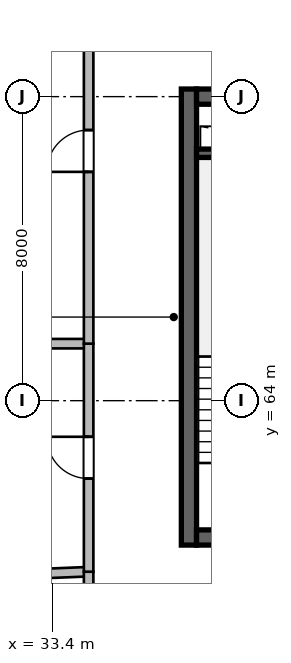
"""IFC4 building model, lengths in metres.
Left out: names, types, materials, properties, quantities, classifications, styles, units other than length and angle.
Written with IfcOpenShell. Run it as: python <this file> out.ifc"""

import sys

from ifc_helpers import new_model, si_unit, direction, frame, frame_2d, origin, place, context, subcontext, project, spatial, rectangle, extrude, source, transform, mapped, element, fill, save


model = new_model("IFC4")
c1 = context("Model", 3, precision=1e-05, world=origin(), true_north=direction((0.0, 1.0)))
c2 = subcontext(c1, "Body", "Model", "MODEL_VIEW")
j1 = project(units=[si_unit("LENGTHUNIT", "METRE"), si_unit("PLANEANGLEUNIT", "RADIAN")], contexts=[c1])
p1 = place(None, origin())
s1 = spatial("IfcSite", under=j1, at=p1, CompositionType="ELEMENT")
p2 = place(p1, origin())
s2 = spatial("IfcBuilding", under=s1, at=p2, CompositionType="ELEMENT")
p3 = place(p2, frame((0.0, 0.0, 291.3)))
s3 = spatial("IfcBuildingStorey", under=s2, at=p3, CompositionType="ELEMENT", Elevation=291.3)
m1 = source(origin(), c2, "Body", "SweptSolid", [
    extrude(rectangle(XDim=12.0, YDim=0.4, at=frame_2d((6.0, 0.0))), origin(), (0.0, 0.0, 1.0), 3.9),
])
p4 = place(p3, frame((37.0, 60.2, 0.0), z_axis=(0.0, 0.0, 1.0), x_axis=(0.0, 1.0, 0.0)))
e1 = element("IfcWall", 1, at=p4, inside=s3, PredefinedType="SHEAR", context=c2, shape_type="MappedRepresentation", body=[
    mapped(m1, transform((0.0, 0.0, 0.0), scale=1.0)),
])
m2 = source(origin(), c2, "Body", "SweptSolid", [
    extrude(rectangle(XDim=21.6, YDim=0.4, at=frame_2d((10.8, 0.0))), origin(), (0.0, 0.0, 1.0), 3.9),
])
p5 = place(p3, frame((37.2, 60.4, 0.0), z_axis=(0.0, 0.0, 1.0), x_axis=(1.0, 0.0, 0.0)))
e2 = element("IfcWall", 2, at=p5, inside=s3, PredefinedType="SHEAR", context=c2, shape_type="MappedRepresentation", body=[
    mapped(m2, transform((0.0, 0.0, 0.0), scale=1.0)),
])
p6 = place(p5, frame((1.1, 0.0, 0.0)))
e3 = element("IfcOpeningElement", 3, at=p6, cuts=e2, PredefinedType="OPENING", context=c2, shape_type="SweptSolid", body=[
    extrude(rectangle(XDim=1.15, YDim=2.15, at=frame_2d((0.575, 1.075))), frame((0.0, 0.21, 0.0), z_axis=(0.0, -1.0, 0.0), x_axis=(1.0, 0.0, 0.0)), (0.0, 0.0, 1.0), 0.42),
])
p7 = place(p5, frame((19.5, 0.0, 0.0)))
e4 = element("IfcOpeningElement", 4, at=p7, cuts=e2, PredefinedType="OPENING", context=c2, shape_type="SweptSolid", body=[
    extrude(rectangle(XDim=0.9, YDim=2.1, at=frame_2d((0.45, 1.05))), frame((0.0, 0.21, 0.0), z_axis=(0.0, -1.0, 0.0), x_axis=(1.0, 0.0, 0.0)), (0.0, 0.0, 1.0), 0.42),
])
p8 = place(p5, frame((12.02, 0.0, 0.0)))
e5 = element("IfcOpeningElement", 5, at=p8, cuts=e2, PredefinedType="OPENING", context=c2, shape_type="SweptSolid", body=[
    extrude(rectangle(XDim=1.6, YDim=2.15, at=frame_2d((0.8, 1.075))), frame((0.0, 0.21, 0.0), z_axis=(0.0, -1.0, 0.0), x_axis=(1.0, 0.0, 0.0)), (0.0, 0.0, 1.0), 0.42),
])
p9 = place(p3, frame((37.2, 72.0, 0.0), z_axis=(0.0, 0.0, 1.0), x_axis=(1.0, 0.0, 0.0)))
e6 = element("IfcWall", 6, at=p9, inside=s3, PredefinedType="SHEAR", context=c2, shape_type="MappedRepresentation", body=[
    mapped(m2, transform((0.0, 0.0, 0.0), scale=1.0)),
])
p10 = place(p9, frame((1.2, 0.0, 0.0)))
e7 = element("IfcOpeningElement", 7, at=p10, cuts=e6, PredefinedType="OPENING", context=c2, shape_type="SweptSolid", body=[
    extrude(rectangle(XDim=0.9, YDim=2.1, at=frame_2d((0.45, 1.05))), frame((0.0, 0.21, 0.0), z_axis=(0.0, -1.0, 0.0), x_axis=(1.0, 0.0, 0.0)), (0.0, 0.0, 1.0), 0.42),
])
p11 = place(p9, frame((14.7, 0.0, 0.0)))
e8 = element("IfcOpeningElement", 8, at=p11, cuts=e6, PredefinedType="OPENING", context=c2, shape_type="SweptSolid", body=[
    extrude(rectangle(XDim=1.2, YDim=2.15, at=frame_2d((0.6, 1.075))), frame((0.0, 0.21, 0.0), z_axis=(0.0, -1.0, 0.0), x_axis=(1.0, 0.0, 0.0)), (0.0, 0.0, 1.0), 0.42),
])
p12 = place(p9, frame((4.15, 0.0, 0.0)))
e9 = element("IfcOpeningElement", 9, at=p12, cuts=e6, PredefinedType="OPENING", context=c2, shape_type="SweptSolid", body=[
    extrude(rectangle(XDim=1.3, YDim=2.15, at=frame_2d((0.65, 1.075))), frame((0.0, 0.21, 0.0), z_axis=(0.0, -1.0, 0.0), x_axis=(1.0, 0.0, 0.0)), (0.0, 0.0, 1.0), 0.42),
])
p13 = place(p9, frame((7.1, 0.0, 0.0)))
e10 = element("IfcOpeningElement", 10, at=p13, cuts=e6, PredefinedType="OPENING", context=c2, shape_type="SweptSolid", body=[
    extrude(rectangle(XDim=0.9, YDim=2.1, at=frame_2d((0.45, 1.05))), frame((0.0, 0.21, 0.0), z_axis=(0.0, -1.0, 0.0), x_axis=(1.0, 0.0, 0.0)), (0.0, 0.0, 1.0), 0.42),
])
m3 = source(origin(), c2, "Body", "SweptSolid", [
    extrude(rectangle(XDim=3.27, YDim=0.22, at=frame_2d((1.635, 0.0))), origin(), (0.0, 0.0, 1.0), 3.9),
])
p14 = place(p3, frame((37.2, 70.51, 0.0), z_axis=(0.0, 0.0, 1.0), x_axis=(1.0, 0.0, 0.0)))
e11 = element("IfcWall", 11, at=p14, inside=s3, PredefinedType="SHEAR", context=c2, shape_type="MappedRepresentation", body=[
    mapped(m3, transform((0.0, 0.0, 0.0), scale=1.0)),
])
m4 = source(origin(), c2, "Body", "SweptSolid", [
    extrude(rectangle(XDim=13.499, YDim=0.25, at=frame_2d((6.75, 0.0))), origin(), (0.0, 0.0, 1.0), 3.64),
])
p15 = place(p3, frame((20.872, 58.951, 0.0), z_axis=(0.0, 0.0, 1.0), x_axis=(0.999172424054, 0.04067513995, 0.0)))
e12 = element("IfcWall", 12, at=p15, inside=s3, PredefinedType="PARTITIONING", context=c2, shape_type="MappedRepresentation", body=[
    mapped(m4, transform((0.0, 0.0, 0.0), scale=1.0)),
])
m5 = source(origin(), c2, "Body", "SweptSolid", [
    extrude(rectangle(XDim=1.54, YDim=0.25, at=frame_2d((0.77, 0.0))), origin(), (0.0, 0.0, 1.0), 3.64),
])
p16 = place(p3, frame((34.36, 57.96, 0.0), z_axis=(0.0, 0.0, 1.0), x_axis=(0.0, 1.0, 0.0)))
e13 = element("IfcWall", 13, at=p16, inside=s3, PredefinedType="PARTITIONING", context=c2, shape_type="MappedRepresentation", body=[
    mapped(m5, transform((0.0, 0.0, 0.0), scale=1.0)),
])
m6 = source(origin(), c2, "Body", "SweptSolid", [
    extrude(rectangle(XDim=12.517, YDim=0.25, at=frame_2d((6.258, 0.0))), origin(), (0.0, 0.0, 1.0), 3.64),
])
p17 = place(p3, frame((21.844, 65.5, 0.0), z_axis=(0.0, 0.0, 1.0), x_axis=(1.0, 0.0, 0.0)))
e14 = element("IfcWall", 14, at=p17, inside=s3, PredefinedType="PARTITIONING", context=c2, shape_type="MappedRepresentation", body=[
    mapped(m6, transform((0.0, 0.0, 0.0), scale=1.0)),
])
m7 = source(origin(), c2, "Body", "SweptSolid", [
    extrude(rectangle(XDim=6.0, YDim=0.25, at=frame_2d((3.0, 0.0))), origin(), (0.0, 0.0, 1.0), 3.64),
])
p18 = place(p3, frame((34.36, 59.5, 0.0), z_axis=(0.0, 0.0, 1.0), x_axis=(0.0, 1.0, 0.0)))
e15 = element("IfcWall", 15, at=p18, inside=s3, PredefinedType="PARTITIONING", context=c2, shape_type="MappedRepresentation", body=[
    mapped(m7, transform((0.0, 0.0, 0.0), scale=1.0)),
])
p19 = place(p18, frame((2.45, 0.0, 0.0)))
e16 = element("IfcOpeningElement", 16, at=p19, cuts=e15, PredefinedType="OPENING", context=c2, shape_type="SweptSolid", body=[
    extrude(rectangle(XDim=1.1, YDim=2.15, at=frame_2d((0.55, 1.075))), frame((0.0, 0.135, 0.0), z_axis=(0.0, -1.0, 0.0), x_axis=(1.0, 0.0, 0.0)), (0.0, 0.0, 1.0), 0.27),
])
m8 = source(origin(), c2, "Body", "SweptSolid", [
    extrude(rectangle(XDim=10.141, YDim=0.25, at=frame_2d((5.07, 0.0))), origin(), (0.0, 0.0, 1.0), 3.64),
])
p20 = place(p3, frame((34.36, 65.5, 0.0), z_axis=(0.0, 0.0, 1.0), x_axis=(0.0, 1.0, 0.0)))
e17 = element("IfcWall", 17, at=p20, inside=s3, PredefinedType="PARTITIONING", context=c2, shape_type="MappedRepresentation", body=[
    mapped(m8, transform((0.0, 0.0, 0.0), scale=1.0)),
])
p21 = place(p20, frame((4.521, 0.0, 0.0)))
e18 = element("IfcOpeningElement", 18, at=p21, cuts=e17, PredefinedType="OPENING", context=c2, shape_type="SweptSolid", body=[
    extrude(rectangle(XDim=1.1, YDim=2.15, at=frame_2d((0.55, 1.075))), frame((0.0, 0.135, 0.0), z_axis=(0.0, -1.0, 0.0), x_axis=(1.0, 0.0, 0.0)), (0.0, 0.0, 1.0), 0.27),
])
m9 = source(origin(), c2, "Body", "SweptSolid", [
    extrude(rectangle(XDim=1.1, YDim=2.15, at=frame_2d((0.55, 1.075))), frame((0.0, 0.025, 0.0), z_axis=(0.0, -1.0, 0.0), x_axis=(1.0, 0.0, 0.0)), (0.0, 0.0, 1.0), 0.05),
])
p22 = place(p19, origin())
e19 = element("IfcDoor", 19, at=p22, inside=s3, OperationType="SINGLE_SWING_RIGHT", PredefinedType="DOOR", context=c2, shape_type="MappedRepresentation", body=[
    mapped(m9, transform((0.0, 0.0, 0.0), scale=1.0)),
])
fill(e16, e19)
p23 = place(p21, origin())
e20 = element("IfcDoor", 20, at=p23, inside=s3, OperationType="SINGLE_SWING_LEFT", PredefinedType="DOOR", context=c2, shape_type="MappedRepresentation", body=[
    mapped(m9, transform((0.0, 0.0, 0.0), scale=1.0)),
])
fill(e18, e20)
save(model, sys.argv[1])
